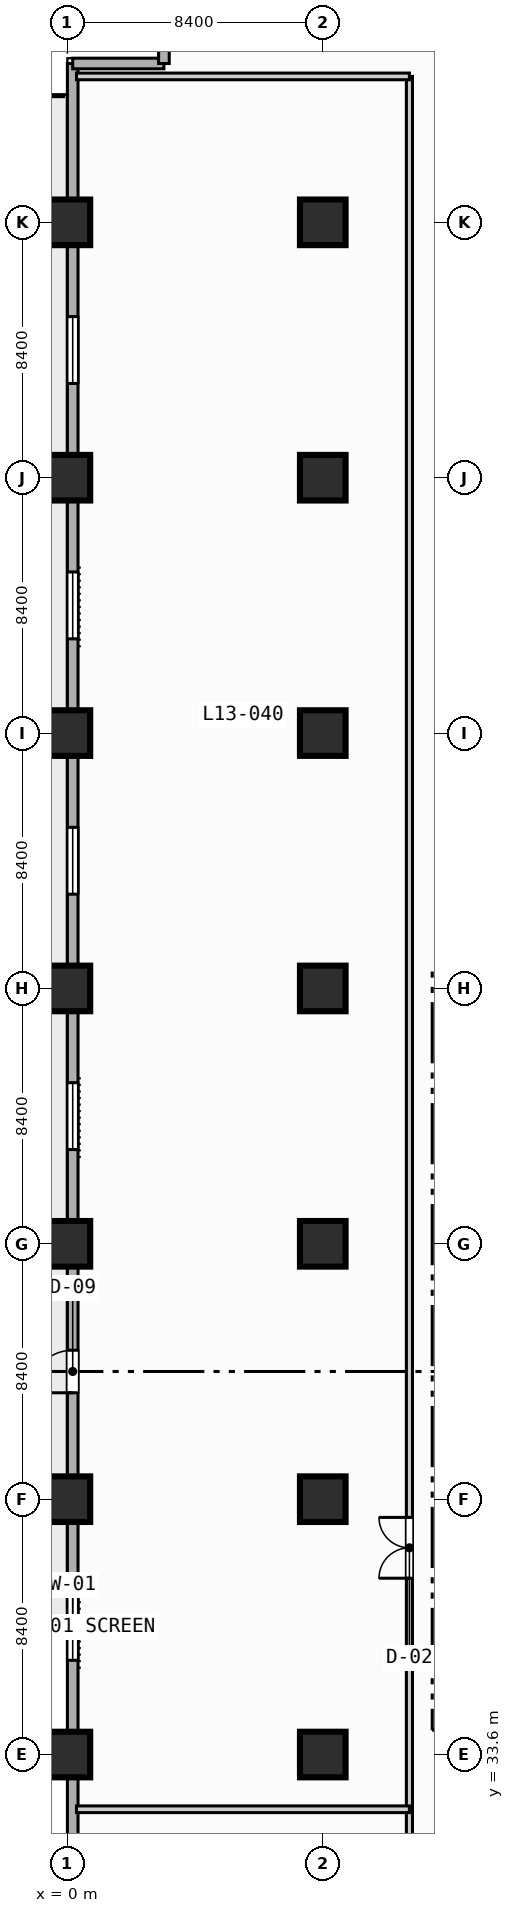
"""IFC4 building model, lengths in metres.
Left out: names, types, materials, properties, quantities, classifications, styles, units other than length and angle.
Written with IfcOpenShell. Run it as: python <this file> out.ifc"""

import sys

from ifc_helpers import new_model, si_unit, direction, frame, frame_2d, origin, origin_2d, place, context, subcontext, project, spatial, rectangle, extrude, element, fill, save


model = new_model("IFC4")
c1 = context("Model", 3, precision=1e-05, world=origin(), true_north=direction((0.0, 1.0)))
c2 = subcontext(c1, "Body", "Model", "MODEL_VIEW")
j1 = project(units=[si_unit("LENGTHUNIT", "METRE"), si_unit("PLANEANGLEUNIT", "RADIAN")], contexts=[c1])
p1 = place(None, origin())
s1 = spatial("IfcSite", under=j1, at=p1, CompositionType="ELEMENT")
p2 = place(p1, origin())
s2 = spatial("IfcBuilding", under=s1, at=p2, CompositionType="ELEMENT")
p3 = place(p2, frame((0.0, 0.0, 58.6)))
s3 = spatial("IfcBuildingStorey", under=s2, at=p3, CompositionType="ELEMENT", Elevation=58.6)
for number, where, z_axis, x_axis in (
    (1, (0.0, 33.6, 0.0), (0.0, 0.0, 1.0), (1.0, 0.0, 0.0)),
    (2, (0.0, 42.0, 0.0), (0.0, 0.0, 1.0), (1.0, 0.0, 0.0)),
    (3, (0.0, 50.4, 0.0), (0.0, 0.0, 1.0), (1.0, 0.0, 0.0)),
    (4, (0.0, 58.8, 0.0), (0.0, 0.0, 1.0), (1.0, 0.0, 0.0)),
    (5, (0.0, 67.2, 0.0), (0.0, 0.0, 1.0), (1.0, 0.0, 0.0)),
    (6, (0.0, 75.6, 0.0), (0.0, 0.0, 1.0), (1.0, 0.0, 0.0)),
    (7, (0.0, 84.0, 0.0), (0.0, 0.0, 1.0), (1.0, 0.0, 0.0)),
    (8, (8.4, 33.6, 0.0), (0.0, 0.0, 1.0), (1.0, 0.0, 0.0)),
    (9, (8.4, 42.0, 0.0), (0.0, 0.0, 1.0), (1.0, 0.0, 0.0)),
    (10, (8.4, 50.4, 0.0), (0.0, 0.0, 1.0), (1.0, 0.0, 0.0)),
    (11, (8.4, 58.8, 0.0), (0.0, 0.0, 1.0), (1.0, 0.0, 0.0)),
    (12, (8.4, 67.2, 0.0), (0.0, 0.0, 1.0), (1.0, 0.0, 0.0)),
    (13, (8.4, 75.6, 0.0), (0.0, 0.0, 1.0), (1.0, 0.0, 0.0)),
    (14, (8.4, 84.0, 0.0), (0.0, 0.0, 1.0), (1.0, 0.0, 0.0)),
):
    element("IfcColumn", number, at=place(p3, frame(where, z_axis=z_axis, x_axis=x_axis)), inside=s3, PredefinedType="COLUMN", context=c2, shape_type="SweptSolid", body=[
        extrude(rectangle(XDim=1.5, YDim=1.5, at=origin_2d()), origin(), (0.0, 0.0, 1.0), 3.8),
    ])
p4 = place(p3, frame((0.175, 3.175, 0.0), z_axis=(0.0, 0.0, 1.0), x_axis=(0.0, 1.0, 0.0)))
e15 = element("IfcWall", 15, at=p4, inside=s3, PredefinedType="STANDARD", context=c2, shape_type="SweptSolid", body=[
    extrude(rectangle(XDim=86.05, YDim=0.35, at=frame_2d((43.025, 0.0))), origin(), (0.0, 0.0, 1.0), 3.55),
])
p5 = place(p4, frame((42.325, 0.0, 0.0)))
e16 = element("IfcOpeningElement", 16, at=p5, cuts=e15, PredefinedType="OPENING", context=c2, shape_type="SweptSolid", body=[
    extrude(rectangle(XDim=1.4, YDim=2.2, at=frame_2d((0.7, 1.1))), frame((0.0, 0.185, 0.0), z_axis=(0.0, -1.0, 0.0), x_axis=(1.0, 0.0, 0.0)), (0.0, 0.0, 1.0), 0.37),
])
p6 = place(p4, frame((33.525, 0.0, 0.85)))
e17 = element("IfcOpeningElement", 17, at=p6, cuts=e15, PredefinedType="OPENING", context=c2, shape_type="SweptSolid", body=[
    extrude(rectangle(XDim=2.2, YDim=1.8, at=frame_2d((1.1, 0.9))), frame((0.0, 0.185, 0.0), z_axis=(0.0, -1.0, 0.0), x_axis=(1.0, 0.0, 0.0)), (0.0, 0.0, 1.0), 0.37),
])
p7 = place(p4, frame((50.325, 0.0, 0.85)))
e18 = element("IfcOpeningElement", 18, at=p7, cuts=e15, PredefinedType="OPENING", context=c2, shape_type="SweptSolid", body=[
    extrude(rectangle(XDim=2.2, YDim=1.8, at=frame_2d((1.1, 0.9))), frame((0.0, 0.185, 0.0), z_axis=(0.0, -1.0, 0.0), x_axis=(1.0, 0.0, 0.0)), (0.0, 0.0, 1.0), 0.37),
])
p8 = place(p4, frame((58.725, 0.0, 0.85)))
e19 = element("IfcOpeningElement", 19, at=p8, cuts=e15, PredefinedType="OPENING", context=c2, shape_type="SweptSolid", body=[
    extrude(rectangle(XDim=2.2, YDim=1.8, at=frame_2d((1.1, 0.9))), frame((0.0, 0.185, 0.0), z_axis=(0.0, -1.0, 0.0), x_axis=(1.0, 0.0, 0.0)), (0.0, 0.0, 1.0), 0.37),
])
p9 = place(p4, frame((67.125, 0.0, 0.85)))
e20 = element("IfcOpeningElement", 20, at=p9, cuts=e15, PredefinedType="OPENING", context=c2, shape_type="SweptSolid", body=[
    extrude(rectangle(XDim=2.2, YDim=1.8, at=frame_2d((1.1, 0.9))), frame((0.0, 0.185, 0.0), z_axis=(0.0, -1.0, 0.0), x_axis=(1.0, 0.0, 0.0)), (0.0, 0.0, 1.0), 0.37),
])
p10 = place(p4, frame((75.525, 0.0, 0.85)))
e21 = element("IfcOpeningElement", 21, at=p10, cuts=e15, PredefinedType="OPENING", context=c2, shape_type="SweptSolid", body=[
    extrude(rectangle(XDim=2.2, YDim=1.8, at=frame_2d((1.1, 0.9))), frame((0.0, 0.185, 0.0), z_axis=(0.0, -1.0, 0.0), x_axis=(1.0, 0.0, 0.0)), (0.0, 0.0, 1.0), 0.37),
])
for number, where, z_axis, x_axis in (
    (22, (0.175, 89.225, 0.0), (0.0, 0.0, 1.0), (1.0, 0.0, 0.0)),
    (23, (3.175, 89.225, 0.0), (0.0, 0.0, 1.0), (0.0, 1.0, 0.0)),
):
    element("IfcWall", number, at=place(p3, frame(where, z_axis=z_axis, x_axis=x_axis)), inside=s3, PredefinedType="STANDARD", context=c2, shape_type="SweptSolid", body=[
        extrude(rectangle(XDim=3.0, YDim=0.35, at=frame_2d((1.5, 0.0))), origin(), (0.0, 0.0, 1.0), 3.55),
    ])
p11 = place(p3, frame((11.25, 3.4, 0.0), z_axis=(0.0, 0.0, 1.0), x_axis=(0.0, 1.0, 0.0)))
e24 = element("IfcWall", 24, at=p11, inside=s3, PredefinedType="PARTITIONING", context=c2, shape_type="SweptSolid", body=[
    extrude(rectangle(XDim=85.4, YDim=0.2, at=frame_2d((42.7, 0.0))), origin(), (0.0, 0.0, 1.0), 3.55),
])
p12 = place(p11, frame((8.0, 0.0, 0.0)))
e25 = element("IfcOpeningElement", 25, at=p12, cuts=e24, PredefinedType="OPENING", context=c2, shape_type="SweptSolid", body=[
    extrude(rectangle(XDim=2.0, YDim=2.15, at=frame_2d((1.0, 1.075))), frame((0.0, 0.11, 0.0), z_axis=(0.0, -1.0, 0.0), x_axis=(1.0, 0.0, 0.0)), (0.0, 0.0, 1.0), 0.22),
])
p13 = place(p11, frame((36.0, 0.0, 0.0)))
e26 = element("IfcOpeningElement", 26, at=p13, cuts=e24, PredefinedType="OPENING", context=c2, shape_type="SweptSolid", body=[
    extrude(rectangle(XDim=2.0, YDim=2.15, at=frame_2d((1.0, 1.075))), frame((0.0, 0.11, 0.0), z_axis=(0.0, -1.0, 0.0), x_axis=(1.0, 0.0, 0.0)), (0.0, 0.0, 1.0), 0.22),
])
for number, where, z_axis, x_axis in (
    (27, (0.3, 31.8, 0.0), (0.0, 0.0, 1.0), (1.0, 0.0, 0.0)),
    (28, (0.3, 88.8, 0.0), (0.0, 0.0, 1.0), (1.0, 0.0, 0.0)),
):
    element("IfcWall", number, at=place(p3, frame(where, z_axis=z_axis, x_axis=x_axis)), inside=s3, PredefinedType="PARTITIONING", context=c2, shape_type="SweptSolid", body=[
        extrude(rectangle(XDim=10.95, YDim=0.22, at=frame_2d((5.475, 0.0))), origin(), (0.0, 0.0, 1.0), 3.55),
    ])
p14 = place(p5, origin())
e29 = element("IfcDoor", 29, at=p14, inside=s3, OperationType="SINGLE_SWING_LEFT", PredefinedType="DOOR", context=c2, shape_type="SweptSolid", body=[
    extrude(rectangle(XDim=1.4, YDim=2.2, at=frame_2d((0.7, 1.1))), frame((0.0, 0.025, 0.0), z_axis=(0.0, -1.0, 0.0), x_axis=(1.0, 0.0, 0.0)), (0.0, 0.0, 1.0), 0.05),
])
fill(e16, e29)
p15 = place(p6, origin())
e30 = element("IfcWindow", 30, at=p15, inside=s3, PartitioningType="SINGLE_PANEL", PredefinedType="WINDOW", context=c2, shape_type="SweptSolid", body=[
    extrude(rectangle(XDim=2.2, YDim=1.8, at=frame_2d((1.1, 0.9))), frame((0.0, 0.03, 0.0), z_axis=(0.0, -1.0, 0.0), x_axis=(1.0, 0.0, 0.0)), (0.0, 0.0, 1.0), 0.06),
])
fill(e17, e30)
p16 = place(p7, origin())
e31 = element("IfcWindow", 31, at=p16, inside=s3, PartitioningType="SINGLE_PANEL", PredefinedType="WINDOW", context=c2, shape_type="SweptSolid", body=[
    extrude(rectangle(XDim=2.2, YDim=1.8, at=frame_2d((1.1, 0.9))), frame((0.0, 0.03, 0.0), z_axis=(0.0, -1.0, 0.0), x_axis=(1.0, 0.0, 0.0)), (0.0, 0.0, 1.0), 0.06),
])
fill(e18, e31)
p17 = place(p8, origin())
e32 = element("IfcWindow", 32, at=p17, inside=s3, PartitioningType="SINGLE_PANEL", PredefinedType="WINDOW", context=c2, shape_type="SweptSolid", body=[
    extrude(rectangle(XDim=2.2, YDim=1.8, at=frame_2d((1.1, 0.9))), frame((0.0, 0.03, 0.0), z_axis=(0.0, -1.0, 0.0), x_axis=(1.0, 0.0, 0.0)), (0.0, 0.0, 1.0), 0.06),
])
fill(e19, e32)
p18 = place(p9, origin())
e33 = element("IfcWindow", 33, at=p18, inside=s3, PartitioningType="SINGLE_PANEL", PredefinedType="WINDOW", context=c2, shape_type="SweptSolid", body=[
    extrude(rectangle(XDim=2.2, YDim=1.8, at=frame_2d((1.1, 0.9))), frame((0.0, 0.03, 0.0), z_axis=(0.0, -1.0, 0.0), x_axis=(1.0, 0.0, 0.0)), (0.0, 0.0, 1.0), 0.06),
])
fill(e20, e33)
p19 = place(p10, origin())
e34 = element("IfcWindow", 34, at=p19, inside=s3, PartitioningType="SINGLE_PANEL", PredefinedType="WINDOW", context=c2, shape_type="SweptSolid", body=[
    extrude(rectangle(XDim=2.2, YDim=1.8, at=frame_2d((1.1, 0.9))), frame((0.0, 0.03, 0.0), z_axis=(0.0, -1.0, 0.0), x_axis=(1.0, 0.0, 0.0)), (0.0, 0.0, 1.0), 0.06),
])
fill(e21, e34)
p20 = place(p13, origin())
e35 = element("IfcDoor", 35, at=p20, inside=s3, OperationType="SINGLE_SWING_LEFT", PredefinedType="DOOR", context=c2, shape_type="SweptSolid", body=[
    extrude(rectangle(XDim=2.0, YDim=2.15, at=frame_2d((1.0, 1.075))), frame((0.0, 0.025, 0.0), z_axis=(0.0, -1.0, 0.0), x_axis=(1.0, 0.0, 0.0)), (0.0, 0.0, 1.0), 0.05),
])
fill(e26, e35)
save(model, sys.argv[1])
